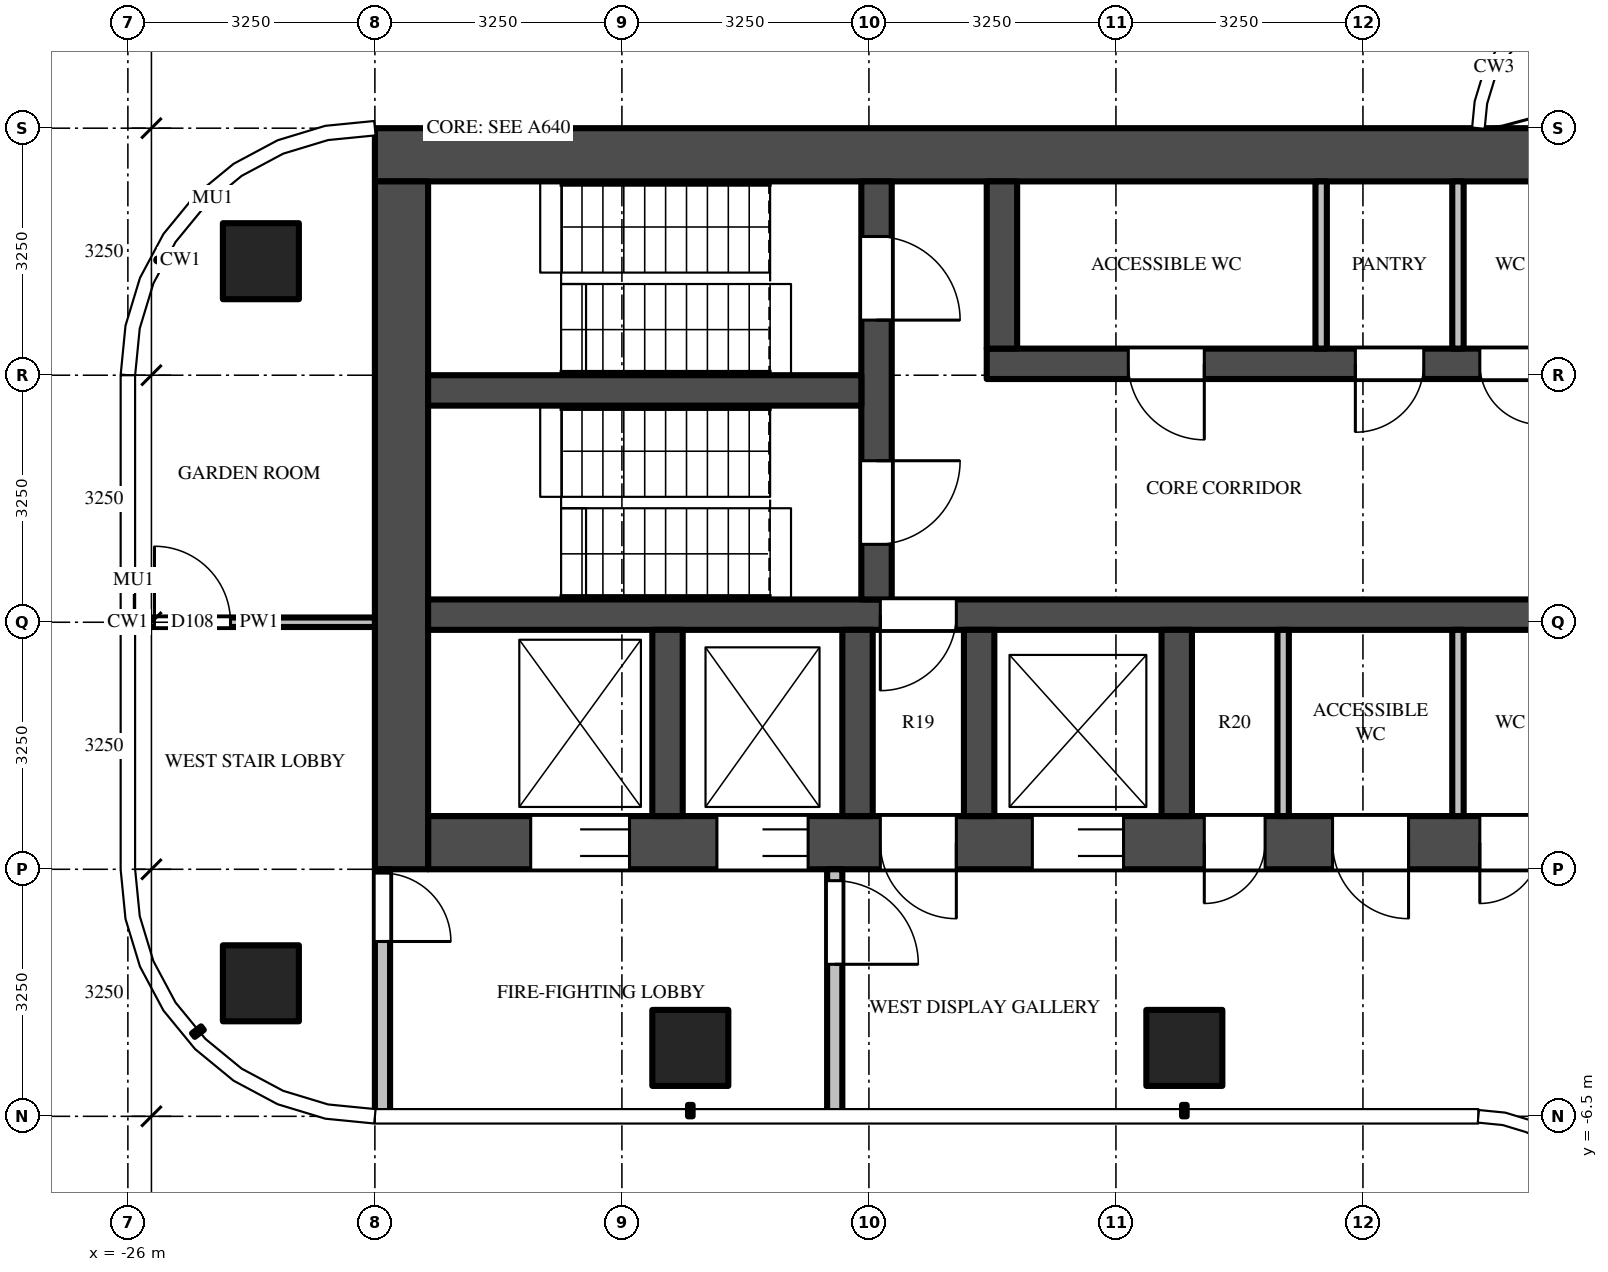
"""IFC4 building model, lengths in metres.
Left out: names, types, materials, properties, quantities, classifications, styles, units other than length and angle.
Written with IfcOpenShell. Run it as: python <this file> out.ifc"""

import sys

from ifc_helpers import new_model, si_unit, direction, frame, frame_2d, origin, origin_2d, place, context, subcontext, project, spatial, rectangle, extrude, source, transform, mapped, element, fill, save


model = new_model("IFC4")
c1 = context("Model", 3, precision=1e-05, world=origin(), true_north=direction((0.0, 1.0)))
c2 = subcontext(c1, "Body", "Model", "MODEL_VIEW")
j1 = project(units=[si_unit("LENGTHUNIT", "METRE"), si_unit("PLANEANGLEUNIT", "RADIAN")], contexts=[c1])
p1 = place(None, origin())
s1 = spatial("IfcSite", under=j1, at=p1, CompositionType="ELEMENT")
p2 = place(p1, origin())
s2 = spatial("IfcBuilding", under=s1, at=p2, CompositionType="ELEMENT")
p3 = place(p2, frame((0.0, 0.0, 302.8)))
s3 = spatial("IfcBuildingStorey", under=s2, at=p3, CompositionType="ELEMENT", Elevation=302.8)
m1 = source(origin(), c2, "Body", "SweptSolid", [
    extrude(rectangle(XDim=1.0, YDim=1.0, at=origin_2d()), origin(), (0.0, 0.0, 1.0), 3.9),
])
for number, where, z_axis, x_axis in (
    (1, (-12.1, -5.6, 0.0), (0.0, 0.0, 1.0), (1.0, 0.0, 0.0)),
    (2, (-18.6, -5.6, 0.0), (0.0, 0.0, 1.0), (1.0, 0.0, 0.0)),
    (3, (-24.25, -4.75, 0.0), (0.0, 0.0, 1.0), (1.0, 0.0, 0.0)),
    (4, (-24.25, 4.75, 0.0), (0.0, 0.0, 1.0), (1.0, 0.0, 0.0)),
):
    element("IfcColumn", number, at=place(p3, frame(where, z_axis=z_axis, x_axis=x_axis)), inside=s3, PredefinedType="COLUMN", context=c2, shape_type="MappedRepresentation", body=[
        mapped(m1, transform((0.0, 0.0, 0.0))),
    ])
m2 = source(origin(), c2, "Body", "SweptSolid", [
    extrude(rectangle(XDim=16.65, YDim=0.7, at=frame_2d((8.325, 0.0))), origin(), (0.0, 0.0, 1.0), 3.7),
])
p4 = place(p3, frame((-6.1, 6.15, 0.0), z_axis=(0.0, 0.0, 1.0), x_axis=(-1.0, 0.0, 0.0)))
e5 = element("IfcWall", 5, at=p4, inside=s3, PredefinedType="SHEAR", context=c2, shape_type="MappedRepresentation", body=[
    mapped(m2, transform((0.0, 0.0, 0.0))),
])
m3 = source(origin(), c2, "Body", "SweptSolid", [
    extrude(rectangle(XDim=14.85, YDim=0.7, at=frame_2d((7.425, 0.0))), origin(), (0.0, 0.0, 1.0), 3.7),
])
p5 = place(p3, frame((-7.2, -2.9, 0.0), z_axis=(0.0, 0.0, 1.0), x_axis=(-1.0, 0.0, 0.0)))
e6 = element("IfcWall", 6, at=p5, inside=s3, PredefinedType="SHEAR", context=c2, shape_type="MappedRepresentation", body=[
    mapped(m3, transform((0.0, 0.0, 0.0))),
])
m4 = source(origin(), c2, "Body", "SweptSolid", [
    extrude(rectangle(XDim=1.2, YDim=2.1, at=frame_2d((0.6, 1.05))), frame((0.0, 0.36, 0.0), z_axis=(0.0, -1.0, 0.0), x_axis=(1.0, 0.0, 0.0)), (0.0, 0.0, 1.0), 0.72),
])
p6 = place(p5, frame((5.7, 0.0, 0.0)))
e7 = element("IfcOpeningElement", 7, at=p6, cuts=e6, PredefinedType="OPENING", context=c2, shape_type="MappedRepresentation", body=[
    mapped(m4, transform((0.0, 0.0, 0.0))),
])
m5 = source(origin(), c2, "Body", "SweptSolid", [
    extrude(rectangle(XDim=1.3, YDim=2.1, at=frame_2d((0.65, 1.05))), frame((0.0, 0.36, 0.0), z_axis=(0.0, -1.0, 0.0), x_axis=(1.0, 0.0, 0.0)), (0.0, 0.0, 1.0), 0.72),
])
p7 = place(p5, frame((12.2, 0.0, 0.0)))
e8 = element("IfcOpeningElement", 8, at=p7, cuts=e6, PredefinedType="OPENING", context=c2, shape_type="MappedRepresentation", body=[
    mapped(m5, transform((0.0, 0.0, 0.0))),
])
p8 = place(p5, frame((9.85, 0.0, 0.0)))
e9 = element("IfcOpeningElement", 9, at=p8, cuts=e6, PredefinedType="OPENING", context=c2, shape_type="MappedRepresentation", body=[
    mapped(m4, transform((0.0, 0.0, 0.0))),
])
m6 = source(origin(), c2, "Body", "SweptSolid", [
    extrude(rectangle(XDim=1.0, YDim=2.1, at=frame_2d((0.5, 1.05))), frame((0.0, 0.36, 0.0), z_axis=(0.0, -1.0, 0.0), x_axis=(1.0, 0.0, 0.0)), (0.0, 0.0, 1.0), 0.72),
])
p9 = place(p5, frame((7.9, 0.0, 0.0)))
e10 = element("IfcOpeningElement", 10, at=p9, cuts=e6, PredefinedType="OPENING", context=c2, shape_type="MappedRepresentation", body=[
    mapped(m6, transform((0.0, 0.0, 0.0))),
])
m7 = source(origin(), c2, "Body", "SweptSolid", [
    extrude(rectangle(XDim=0.8, YDim=2.1, at=frame_2d((0.4, 1.05))), frame((0.0, 0.36, 0.0), z_axis=(0.0, -1.0, 0.0), x_axis=(1.0, 0.0, 0.0)), (0.0, 0.0, 1.0), 0.72),
])
p10 = place(p5, frame((0.212, 0.0, 0.0)))
e11 = element("IfcOpeningElement", 11, at=p10, cuts=e6, PredefinedType="OPENING", context=c2, shape_type="MappedRepresentation", body=[
    mapped(m7, transform((0.0, 0.0, 0.0))),
])
p11 = place(p5, frame((1.95, 0.0, 0.0)))
e12 = element("IfcOpeningElement", 12, at=p11, cuts=e6, PredefinedType="OPENING", context=c2, shape_type="MappedRepresentation", body=[
    mapped(m6, transform((0.0, 0.0, 0.0))),
])
p12 = place(p5, frame((3.837, 0.0, 0.0)))
e13 = element("IfcOpeningElement", 13, at=p12, cuts=e6, PredefinedType="OPENING", context=c2, shape_type="MappedRepresentation", body=[
    mapped(m7, transform((0.0, 0.0, 0.0))),
])
m8 = source(origin(), c2, "Body", "SweptSolid", [
    extrude(rectangle(XDim=9.05, YDim=0.7, at=frame_2d((4.525, 0.0))), origin(), (0.0, 0.0, 1.0), 3.7),
])
p13 = place(p3, frame((-22.4, 5.8, 0.0), z_axis=(0.0, 0.0, 1.0), x_axis=(0.0, -1.0, 0.0)))
e14 = element("IfcWall", 14, at=p13, inside=s3, PredefinedType="SHEAR", context=c2, shape_type="MappedRepresentation", body=[
    mapped(m8, transform((0.0, 0.0, 0.0))),
])
m9 = source(origin(), c2, "Body", "SweptSolid", [
    extrude(rectangle(XDim=7.5, YDim=0.4, at=frame_2d((3.75, 0.0))), origin(), (0.0, 0.0, 1.0), 3.7),
])
p14 = place(p3, frame((-7.2, 3.4, 0.0), z_axis=(0.0, 0.0, 1.0), x_axis=(-1.0, 0.0, 0.0)))
e15 = element("IfcWall", 15, at=p14, inside=s3, PredefinedType="SHEAR", context=c2, shape_type="MappedRepresentation", body=[
    mapped(m9, transform((0.0, 0.0, 0.0))),
])
m10 = source(origin(), c2, "Body", "SweptSolid", [
    extrude(rectangle(XDim=0.8, YDim=2.1, at=frame_2d((0.4, 1.05))), frame((0.0, 0.21, 0.0), z_axis=(0.0, -1.0, 0.0), x_axis=(1.0, 0.0, 0.0)), (0.0, 0.0, 1.0), 0.42),
])
p15 = place(p14, frame((0.212, 0.0, 0.0)))
e16 = element("IfcOpeningElement", 16, at=p15, cuts=e15, PredefinedType="OPENING", context=c2, shape_type="MappedRepresentation", body=[
    mapped(m10, transform((0.0, 0.0, 0.0))),
])
m11 = source(origin(), c2, "Body", "SweptSolid", [
    extrude(rectangle(XDim=0.9, YDim=2.1, at=frame_2d((0.45, 1.05))), frame((0.0, 0.21, 0.0), z_axis=(0.0, -1.0, 0.0), x_axis=(1.0, 0.0, 0.0)), (0.0, 0.0, 1.0), 0.42),
])
p16 = place(p14, frame((1.75, 0.0, 0.0)))
e17 = element("IfcOpeningElement", 17, at=p16, cuts=e15, PredefinedType="OPENING", context=c2, shape_type="MappedRepresentation", body=[
    mapped(m11, transform((0.0, 0.0, 0.0))),
])
m12 = source(origin(), c2, "Body", "SweptSolid", [
    extrude(rectangle(XDim=1.0, YDim=2.1, at=frame_2d((0.5, 1.05))), frame((0.0, 0.21, 0.0), z_axis=(0.0, -1.0, 0.0), x_axis=(1.0, 0.0, 0.0)), (0.0, 0.0, 1.0), 0.42),
])
p17 = place(p14, frame((4.637, 0.0, 0.0)))
e18 = element("IfcOpeningElement", 18, at=p17, cuts=e15, PredefinedType="OPENING", context=c2, shape_type="MappedRepresentation", body=[
    mapped(m12, transform((0.0, 0.0, 0.0))),
])
m13 = source(origin(), c2, "Body", "SweptSolid", [
    extrude(rectangle(XDim=14.85, YDim=0.4, at=frame_2d((7.425, 0.0))), origin(), (0.0, 0.0, 1.0), 3.7),
])
p18 = place(p3, frame((-7.2, 0.1, 0.0), z_axis=(0.0, 0.0, 1.0), x_axis=(-1.0, 0.0, 0.0)))
e19 = element("IfcWall", 19, at=p18, inside=s3, PredefinedType="SHEAR", context=c2, shape_type="MappedRepresentation", body=[
    mapped(m13, transform((0.0, 0.0, 0.0))),
])
p19 = place(p18, frame((7.9, 0.0, 0.0)))
e20 = element("IfcOpeningElement", 20, at=p19, cuts=e19, PredefinedType="OPENING", context=c2, shape_type="MappedRepresentation", body=[
    mapped(m12, transform((0.0, 0.0, 0.0))),
])
m14 = source(origin(), c2, "Body", "SweptSolid", [
    extrude(rectangle(XDim=5.5, YDim=0.4, at=frame_2d((2.75, 0.0))), origin(), (0.0, 0.0, 1.0), 3.7),
])
p20 = place(p3, frame((-16.15, 5.8, 0.0), z_axis=(0.0, 0.0, 1.0), x_axis=(0.0, -1.0, 0.0)))
e21 = element("IfcWall", 21, at=p20, inside=s3, PredefinedType="SHEAR", context=c2, shape_type="MappedRepresentation", body=[
    mapped(m14, transform((0.0, 0.0, 0.0))),
])
m15 = source(origin(), c2, "Body", "SweptSolid", [
    extrude(rectangle(XDim=1.1, YDim=2.1, at=frame_2d((0.55, 1.05))), frame((0.0, 0.21, 0.0), z_axis=(0.0, -1.0, 0.0), x_axis=(1.0, 0.0, 0.0)), (0.0, 0.0, 1.0), 0.42),
])
p21 = place(p20, frame((0.725, 0.0, 0.0)))
e22 = element("IfcOpeningElement", 22, at=p21, cuts=e21, PredefinedType="OPENING", context=c2, shape_type="MappedRepresentation", body=[
    mapped(m15, transform((0.0, 0.0, 0.0))),
])
p22 = place(p20, frame((3.675, 0.0, 0.0)))
e23 = element("IfcOpeningElement", 23, at=p22, cuts=e21, PredefinedType="OPENING", context=c2, shape_type="MappedRepresentation", body=[
    mapped(m15, transform((0.0, 0.0, 0.0))),
])
m16 = source(origin(), c2, "Body", "SweptSolid", [
    extrude(rectangle(XDim=5.7, YDim=0.4, at=frame_2d((2.85, 0.0))), origin(), (0.0, 0.0, 1.0), 3.7),
])
p23 = place(p3, frame((-16.35, 3.05, 0.0), z_axis=(0.0, 0.0, 1.0), x_axis=(-1.0, 0.0, 0.0)))
e24 = element("IfcWall", 24, at=p23, inside=s3, PredefinedType="SHEAR", context=c2, shape_type="MappedRepresentation", body=[
    mapped(m16, transform((0.0, 0.0, 0.0))),
])
m17 = source(origin(), c2, "Body", "SweptSolid", [
    extrude(rectangle(XDim=2.2, YDim=0.4, at=frame_2d((1.1, 0.0))), origin(), (0.0, 0.0, 1.0), 3.7),
])
p24 = place(p3, frame((-14.5, 5.8, 0.0), z_axis=(0.0, 0.0, 1.0), x_axis=(0.0, -1.0, 0.0)))
e25 = element("IfcWall", 25, at=p24, inside=s3, PredefinedType="SHEAR", context=c2, shape_type="MappedRepresentation", body=[
    mapped(m17, transform((0.0, 0.0, 0.0))),
])
m18 = source(origin(), c2, "Body", "SweptSolid", [
    extrude(rectangle(XDim=2.45, YDim=0.4, at=frame_2d((1.225, 0.0))), origin(), (0.0, 0.0, 1.0), 3.7),
])
for number, where, z_axis, x_axis in (
    (26, (-12.2, -0.1, 0.0), (0.0, 0.0, 1.0), (0.0, -1.0, 0.0)),
    (27, (-14.8, -0.1, 0.0), (0.0, 0.0, 1.0), (0.0, -1.0, 0.0)),
    (28, (-16.4, -0.1, 0.0), (0.0, 0.0, 1.0), (0.0, -1.0, 0.0)),
    (29, (-18.9, -0.1, 0.0), (0.0, 0.0, 1.0), (0.0, -1.0, 0.0)),
):
    element("IfcWall", number, at=place(p3, frame(where, z_axis=z_axis, x_axis=x_axis)), inside=s3, PredefinedType="SHEAR", context=c2, shape_type="MappedRepresentation", body=[
        mapped(m18, transform((0.0, 0.0, 0.0))),
    ])
m19 = source(origin(), c2, "Body", "SweptSolid", [
    extrude(rectangle(XDim=3.25, YDim=0.2, at=frame_2d((1.625, 0.0))), origin(), (0.0, 0.0, 1.0), 3.7),
])
p25 = place(p3, frame((-16.7, -3.25, 0.0), z_axis=(0.0, 0.0, 1.0), x_axis=(0.0, -1.0, 0.0)))
e30 = element("IfcWall", 30, at=p25, inside=s3, PredefinedType="PARTITIONING", context=c2, shape_type="MappedRepresentation", body=[
    mapped(m19, transform((0.0, 0.0, 0.0))),
])
m20 = source(origin(), c2, "Body", "SweptSolid", [
    extrude(rectangle(XDim=1.1, YDim=2.1, at=frame_2d((0.55, 1.05))), frame((0.0, 0.11, 0.0), z_axis=(0.0, -1.0, 0.0), x_axis=(1.0, 0.0, 0.0)), (0.0, 0.0, 1.0), 0.22),
])
p26 = place(p25, frame((0.15, 0.0, 0.0)))
e31 = element("IfcOpeningElement", 31, at=p26, cuts=e30, PredefinedType="OPENING", context=c2, shape_type="MappedRepresentation", body=[
    mapped(m20, transform((0.0, 0.0, 0.0))),
])
p27 = place(p3, frame((-22.65, -3.25, 0.0), z_axis=(0.0, 0.0, 1.0), x_axis=(0.0, -1.0, 0.0)))
e32 = element("IfcWall", 32, at=p27, inside=s3, PredefinedType="PARTITIONING", context=c2, shape_type="MappedRepresentation", body=[
    mapped(m19, transform((0.0, 0.0, 0.0))),
])
m21 = source(origin(), c2, "Body", "SweptSolid", [
    extrude(rectangle(XDim=0.9, YDim=2.1, at=frame_2d((0.45, 1.05))), frame((0.0, 0.11, 0.0), z_axis=(0.0, -1.0, 0.0), x_axis=(1.0, 0.0, 0.0)), (0.0, 0.0, 1.0), 0.22),
])
p28 = place(p27, frame((0.05, 0.0, 0.0)))
e33 = element("IfcOpeningElement", 33, at=p28, cuts=e32, PredefinedType="OPENING", context=c2, shape_type="MappedRepresentation", body=[
    mapped(m21, transform((0.0, 0.0, 0.0))),
])
m22 = source(origin(), c2, "Body", "SweptSolid", [
    extrude(rectangle(XDim=2.2, YDim=0.15, at=frame_2d((1.1, 0.0))), origin(), (0.0, 0.0, 1.0), 3.7),
])
for number, where, z_axis, x_axis in (
    (34, (-8.5, 5.8, 0.0), (0.0, 0.0, 1.0), (0.0, -1.0, 0.0)),
    (35, (-10.3, 5.8, 0.0), (0.0, 0.0, 1.0), (0.0, -1.0, 0.0)),
):
    element("IfcWall", number, at=place(p3, frame(where, z_axis=z_axis, x_axis=x_axis)), inside=s3, PredefinedType="PARTITIONING", context=c2, shape_type="MappedRepresentation", body=[
        mapped(m22, transform((0.0, 0.0, 0.0))),
    ])
m23 = source(origin(), c2, "Body", "SweptSolid", [
    extrude(rectangle(XDim=2.45, YDim=0.15, at=frame_2d((1.225, 0.0))), origin(), (0.0, 0.0, 1.0), 3.7),
])
for number, where, z_axis, x_axis in (
    (36, (-8.5, -0.1, 0.0), (0.0, 0.0, 1.0), (0.0, -1.0, 0.0)),
    (37, (-10.8, -0.1, 0.0), (0.0, 0.0, 1.0), (0.0, -1.0, 0.0)),
):
    element("IfcWall", number, at=place(p3, frame(where, z_axis=z_axis, x_axis=x_axis)), inside=s3, PredefinedType="PARTITIONING", context=c2, shape_type="MappedRepresentation", body=[
        mapped(m23, transform((0.0, 0.0, 0.0))),
    ])
m24 = source(origin(), c2, "Body", "SweptSolid", [
    extrude(rectangle(XDim=3.05, YDim=0.125, at=frame_2d((1.525, 0.0))), origin(), (0.0, 0.0, 1.0), 2.78),
])
p29 = place(p3, frame((-25.8, 0.0, 0.0), z_axis=(0.0, 0.0, 1.0), x_axis=(1.0, 0.0, 0.0)))
e38 = element("IfcWall", 38, at=p29, inside=s3, PredefinedType="PARTITIONING", context=c2, shape_type="MappedRepresentation", body=[
    mapped(m24, transform((0.0, 0.0, 0.0))),
])
m25 = source(origin(), c2, "Body", "SweptSolid", [
    extrude(rectangle(XDim=1.0, YDim=2.1, at=frame_2d((0.5, 1.05))), frame((0.0, 0.073, 0.0), z_axis=(0.0, -1.0, 0.0), x_axis=(1.0, 0.0, 0.0)), (0.0, 0.0, 1.0), 0.145),
])
p30 = place(p29, frame((0.15, 0.0, 0.0)))
e39 = element("IfcOpeningElement", 39, at=p30, cuts=e38, PredefinedType="OPENING", context=c2, shape_type="MappedRepresentation", body=[
    mapped(m25, transform((0.0, 0.0, 0.0))),
])
m26 = source(origin(), c2, "Body", "SweptSolid", [
    extrude(rectangle(XDim=1.2, YDim=2.1, at=frame_2d((0.6, 1.05))), frame((0.0, -0.275, 0.0), z_axis=(0.0, -1.0, 0.0), x_axis=(1.0, 0.0, 0.0)), (0.0, 0.0, 1.0), 0.05),
])
p31 = place(p6, origin())
e40 = element("IfcDoor", 40, at=p31, inside=s3, OperationType="DOUBLE_DOOR_SLIDING", PredefinedType="DOOR", context=c2, shape_type="MappedRepresentation", body=[
    mapped(m26, transform((0.0, 0.0, 0.0))),
])
fill(e7, e40)
m27 = source(origin(), c2, "Body", "SweptSolid", [
    extrude(rectangle(XDim=1.3, YDim=2.1, at=frame_2d((0.65, 1.05))), frame((0.0, -0.275, 0.0), z_axis=(0.0, -1.0, 0.0), x_axis=(1.0, 0.0, 0.0)), (0.0, 0.0, 1.0), 0.05),
])
p32 = place(p7, origin())
e41 = element("IfcDoor", 41, at=p32, inside=s3, OperationType="DOUBLE_DOOR_SLIDING", PredefinedType="DOOR", context=c2, shape_type="MappedRepresentation", body=[
    mapped(m27, transform((0.0, 0.0, 0.0))),
])
fill(e8, e41)
p33 = place(p8, origin())
e42 = element("IfcDoor", 42, at=p33, inside=s3, OperationType="DOUBLE_DOOR_SLIDING", PredefinedType="DOOR", context=c2, shape_type="MappedRepresentation", body=[
    mapped(m26, transform((0.0, 0.0, 0.0))),
])
fill(e9, e42)
m28 = source(origin(), c2, "Body", "SweptSolid", [
    extrude(rectangle(XDim=1.1, YDim=2.1, at=frame_2d((0.55, 1.05))), frame((0.0, 0.025, 0.0), z_axis=(0.0, -1.0, 0.0), x_axis=(1.0, 0.0, 0.0)), (0.0, 0.0, 1.0), 0.05),
])
p34 = place(p21, origin())
e43 = element("IfcDoor", 43, at=p34, inside=s3, OperationType="SINGLE_SWING_RIGHT", PredefinedType="DOOR", context=c2, shape_type="MappedRepresentation", body=[
    mapped(m28, transform((0.0, 0.0, 0.0))),
])
fill(e22, e43)
p35 = place(p22, origin())
e44 = element("IfcDoor", 44, at=p35, inside=s3, OperationType="SINGLE_SWING_LEFT", PredefinedType="DOOR", context=c2, shape_type="MappedRepresentation", body=[
    mapped(m28, transform((0.0, 0.0, 0.0))),
])
fill(e23, e44)
m29 = source(origin(), c2, "Body", "SweptSolid", [
    extrude(rectangle(XDim=1.0, YDim=2.1, at=frame_2d((0.5, 1.05))), frame((0.0, 0.025, 0.0), z_axis=(0.0, -1.0, 0.0), x_axis=(1.0, 0.0, 0.0)), (0.0, 0.0, 1.0), 0.05),
])
p36 = place(p19, origin())
e45 = element("IfcDoor", 45, at=p36, inside=s3, OperationType="SINGLE_SWING_RIGHT", PredefinedType="DOOR", context=c2, shape_type="MappedRepresentation", body=[
    mapped(m29, transform((0.0, 0.0, 0.0))),
])
fill(e20, e45)
m30 = source(origin(), c2, "Body", "SweptSolid", [
    extrude(rectangle(XDim=1.0, YDim=2.1, at=frame_2d((0.5, 1.05))), frame((0.0, -0.275, 0.0), z_axis=(0.0, -1.0, 0.0), x_axis=(1.0, 0.0, 0.0)), (0.0, 0.0, 1.0), 0.05),
])
p37 = place(p9, origin())
e46 = element("IfcDoor", 46, at=p37, inside=s3, OperationType="SINGLE_SWING_LEFT", PredefinedType="DOOR", context=c2, shape_type="MappedRepresentation", body=[
    mapped(m30, transform((0.0, 0.0, 0.0))),
])
fill(e10, e46)
p38 = place(p26, origin())
e47 = element("IfcDoor", 47, at=p38, inside=s3, OperationType="SINGLE_SWING_RIGHT", PredefinedType="DOOR", context=c2, shape_type="MappedRepresentation", body=[
    mapped(m28, transform((0.0, 0.0, 0.0))),
])
fill(e31, e47)
m31 = source(origin(), c2, "Body", "SweptSolid", [
    extrude(rectangle(XDim=0.9, YDim=2.1, at=frame_2d((0.45, 1.05))), frame((0.0, 0.025, 0.0), z_axis=(0.0, -1.0, 0.0), x_axis=(1.0, 0.0, 0.0)), (0.0, 0.0, 1.0), 0.05),
])
p39 = place(p28, origin())
e48 = element("IfcDoor", 48, at=p39, inside=s3, OperationType="SINGLE_SWING_RIGHT", PredefinedType="DOOR", context=c2, shape_type="MappedRepresentation", body=[
    mapped(m31, transform((0.0, 0.0, 0.0))),
])
fill(e33, e48)
m32 = source(origin(), c2, "Body", "SweptSolid", [
    extrude(rectangle(XDim=0.8, YDim=2.1, at=frame_2d((0.4, 1.05))), frame((0.0, 0.025, 0.0), z_axis=(0.0, -1.0, 0.0), x_axis=(1.0, 0.0, 0.0)), (0.0, 0.0, 1.0), 0.05),
])
p40 = place(p15, origin())
e49 = element("IfcDoor", 49, at=p40, inside=s3, OperationType="SINGLE_SWING_LEFT", PredefinedType="DOOR", context=c2, shape_type="MappedRepresentation", body=[
    mapped(m32, transform((0.0, 0.0, 0.0))),
])
fill(e16, e49)
p41 = place(p16, origin())
e50 = element("IfcDoor", 50, at=p41, inside=s3, OperationType="SINGLE_SWING_RIGHT", PredefinedType="DOOR", context=c2, shape_type="MappedRepresentation", body=[
    mapped(m31, transform((0.0, 0.0, 0.0))),
])
fill(e17, e50)
p42 = place(p17, origin())
e51 = element("IfcDoor", 51, at=p42, inside=s3, OperationType="SINGLE_SWING_LEFT", PredefinedType="DOOR", context=c2, shape_type="MappedRepresentation", body=[
    mapped(m29, transform((0.0, 0.0, 0.0))),
])
fill(e18, e51)
m33 = source(origin(), c2, "Body", "SweptSolid", [
    extrude(rectangle(XDim=0.8, YDim=2.1, at=frame_2d((0.4, 1.05))), frame((0.0, -0.275, 0.0), z_axis=(0.0, -1.0, 0.0), x_axis=(1.0, 0.0, 0.0)), (0.0, 0.0, 1.0), 0.05),
])
p43 = place(p10, origin())
e52 = element("IfcDoor", 52, at=p43, inside=s3, OperationType="SINGLE_SWING_RIGHT", PredefinedType="DOOR", context=c2, shape_type="MappedRepresentation", body=[
    mapped(m33, transform((0.0, 0.0, 0.0))),
])
fill(e11, e52)
p44 = place(p11, origin())
e53 = element("IfcDoor", 53, at=p44, inside=s3, OperationType="SINGLE_SWING_LEFT", PredefinedType="DOOR", context=c2, shape_type="MappedRepresentation", body=[
    mapped(m30, transform((0.0, 0.0, 0.0))),
])
fill(e12, e53)
p45 = place(p12, origin())
e54 = element("IfcDoor", 54, at=p45, inside=s3, OperationType="SINGLE_SWING_RIGHT", PredefinedType="DOOR", context=c2, shape_type="MappedRepresentation", body=[
    mapped(m33, transform((0.0, 0.0, 0.0))),
])
fill(e13, e54)
p46 = place(p30, origin())
e55 = element("IfcDoor", 55, at=p46, inside=s3, OperationType="SINGLE_SWING_LEFT", PredefinedType="DOOR", context=c2, shape_type="MappedRepresentation", body=[
    mapped(m29, transform((0.0, 0.0, 0.0))),
])
fill(e39, e55)
save(model, sys.argv[1])
